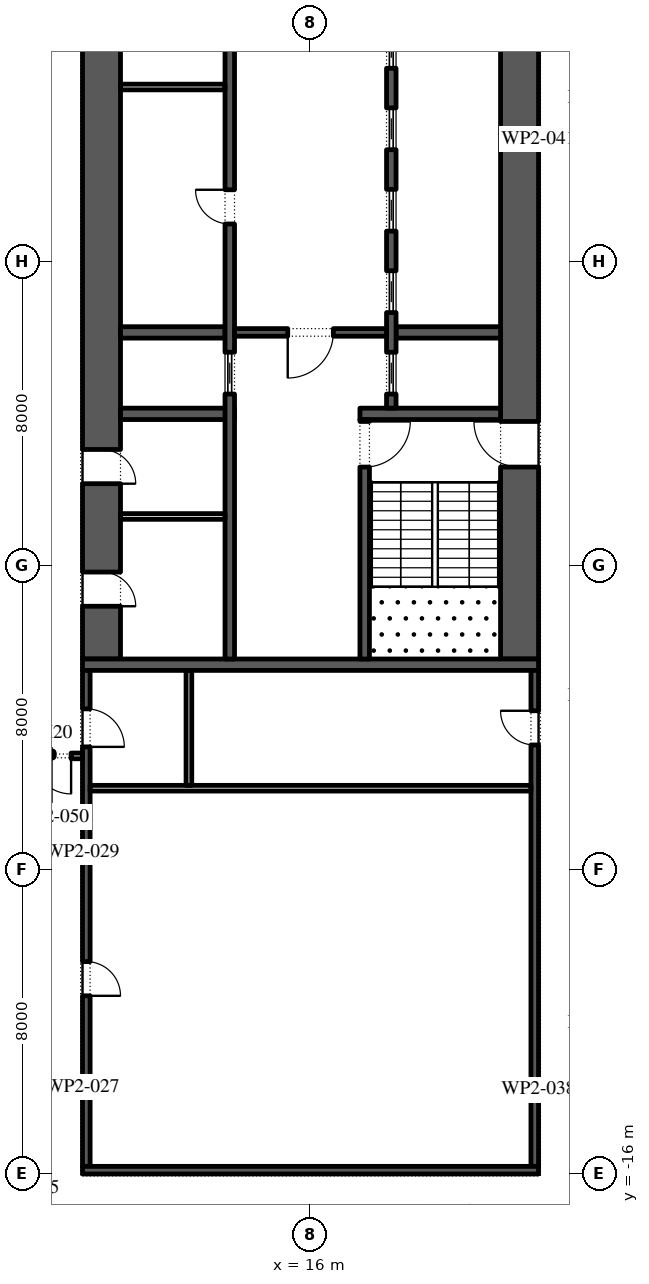
"""IFC4 building model, lengths in metres.
Left out: names, types, materials, properties, quantities, classifications, styles, units other than length and angle.
Written with IfcOpenShell. Run it as: python <this file> out.ifc"""

import sys

from ifc_helpers import new_model, si_unit, direction, frame, frame_2d, origin, place, context, subcontext, project, spatial, rectangle, extrude, element, fill, save


model = new_model("IFC4")
c1 = context("Model", 3, precision=1e-05, world=origin(), true_north=direction((0.0, 1.0)))
c2 = subcontext(c1, "Body", "Model", "MODEL_VIEW")
j1 = project(units=[si_unit("LENGTHUNIT", "METRE"), si_unit("PLANEANGLEUNIT", "RADIAN")], contexts=[c1])
p1 = place(None, origin())
s1 = spatial("IfcSite", under=j1, at=p1, CompositionType="ELEMENT")
p2 = place(p1, origin())
s2 = spatial("IfcBuilding", under=s1, at=p2, CompositionType="ELEMENT")
p3 = place(p2, frame((0.0, 0.0, 43.8)))
s3 = spatial("IfcBuildingStorey", under=s2, at=p3, CompositionType="ELEMENT", Elevation=43.8)
p4 = place(p3, frame((21.5, -2.45, 0.0), z_axis=(0.0, 0.0, 1.0), x_axis=(0.0, 1.0, 0.0)))
e1 = element("IfcWall", 1, at=p4, inside=s3, PredefinedType="SHEAR", context=c2, shape_type="SweptSolid", body=[
    extrude(rectangle(XDim=27.9, YDim=1.0, at=frame_2d((13.95, 0.0))), origin(), (0.0, 0.0, 1.0), 4.0),
])
p5 = place(p4, frame((5.05, 0.0, 0.0)))
e2 = element("IfcOpeningElement", 2, at=p5, cuts=e1, PredefinedType="OPENING", context=c2, shape_type="SweptSolid", body=[
    extrude(rectangle(XDim=1.2, YDim=2.1, at=frame_2d((0.6, 1.05))), frame((0.0, 0.51, 0.0), z_axis=(0.0, -1.0, 0.0), x_axis=(1.0, 0.0, 0.0)), (0.0, 0.0, 1.0), 1.02),
])
p6 = place(p4, frame((21.65, 0.0, 0.0)))
e3 = element("IfcOpeningElement", 3, at=p6, cuts=e1, PredefinedType="OPENING", context=c2, shape_type="SweptSolid", body=[
    extrude(rectangle(XDim=1.2, YDim=2.1, at=frame_2d((0.6, 1.05))), frame((0.0, 0.51, 0.0), z_axis=(0.0, -1.0, 0.0), x_axis=(1.0, 0.0, 0.0)), (0.0, 0.0, 1.0), 1.02),
])
p7 = place(p3, frame((10.5, -2.45, 0.0), z_axis=(0.0, 0.0, 1.0), x_axis=(0.0, 1.0, 0.0)))
e4 = element("IfcWall", 4, at=p7, inside=s3, PredefinedType="SHEAR", context=c2, shape_type="SweptSolid", body=[
    extrude(rectangle(XDim=27.9, YDim=1.0, at=frame_2d((13.95, 0.0))), origin(), (0.0, 0.0, 1.0), 4.0),
])
p8 = place(p7, frame((23.65, 0.0, 0.0)))
e5 = element("IfcOpeningElement", 5, at=p8, cuts=e4, PredefinedType="OPENING", context=c2, shape_type="SweptSolid", body=[
    extrude(rectangle(XDim=2.4, YDim=2.1, at=frame_2d((1.2, 1.05))), frame((0.0, 0.51, 0.0), z_axis=(0.0, -1.0, 0.0), x_axis=(1.0, 0.0, 0.0)), (0.0, 0.0, 1.0), 1.02),
])
p9 = place(p7, frame((1.387, 0.0, 0.0)))
e6 = element("IfcOpeningElement", 6, at=p9, cuts=e4, PredefinedType="OPENING", context=c2, shape_type="SweptSolid", body=[
    extrude(rectangle(XDim=0.9, YDim=2.1, at=frame_2d((0.45, 1.05))), frame((0.0, 0.51, 0.0), z_axis=(0.0, -1.0, 0.0), x_axis=(1.0, 0.0, 0.0)), (0.0, 0.0, 1.0), 1.02),
])
p10 = place(p7, frame((4.613, 0.0, 0.0)))
e7 = element("IfcOpeningElement", 7, at=p10, cuts=e4, PredefinedType="OPENING", context=c2, shape_type="SweptSolid", body=[
    extrude(rectangle(XDim=0.9, YDim=2.1, at=frame_2d((0.45, 1.05))), frame((0.0, 0.51, 0.0), z_axis=(0.0, -1.0, 0.0), x_axis=(1.0, 0.0, 0.0)), (0.0, 0.0, 1.0), 1.02),
])
p11 = place(p3, frame((10.0, -2.6, 0.0), z_axis=(0.0, 0.0, 1.0), x_axis=(1.0, 0.0, 0.0)))
e8 = element("IfcWall", 8, at=p11, inside=s3, PredefinedType="SHEAR", context=c2, shape_type="SweptSolid", body=[
    extrude(rectangle(XDim=12.0, YDim=0.3, at=frame_2d((6.0, 0.0))), origin(), (0.0, 0.0, 1.0), 4.0),
])
p12 = place(p3, frame((17.3, 4.0, 0.0), z_axis=(0.0, 0.0, 1.0), x_axis=(1.0, 0.0, 0.0)))
e9 = element("IfcWall", 9, at=p12, inside=s3, PredefinedType="SHEAR", context=c2, shape_type="SweptSolid", body=[
    extrude(rectangle(XDim=3.7, YDim=0.3, at=frame_2d((1.85, 0.0))), origin(), (0.0, 0.0, 1.0), 4.0),
])
p13 = place(p3, frame((17.425, -2.45, 0.0), z_axis=(0.0, 0.0, 1.0), x_axis=(0.0, 1.0, 0.0)))
e10 = element("IfcWall", 10, at=p13, inside=s3, PredefinedType="SHEAR", context=c2, shape_type="SweptSolid", body=[
    extrude(rectangle(XDim=6.3, YDim=0.25, at=frame_2d((3.15, 0.0))), origin(), (0.0, 0.0, 1.0), 4.0),
])
p14 = place(p13, frame((5.05, 0.0, 0.0)))
e11 = element("IfcOpeningElement", 11, at=p14, cuts=e10, PredefinedType="OPENING", context=c2, shape_type="SweptSolid", body=[
    extrude(rectangle(XDim=1.2, YDim=2.1, at=frame_2d((0.6, 1.05))), frame((0.0, 0.135, 0.0), z_axis=(0.0, -1.0, 0.0), x_axis=(1.0, 0.0, 0.0)), (0.0, 0.0, 1.0), 0.27),
])
p15 = place(p3, frame((18.25, 6.143, 0.0), z_axis=(0.0, 0.0, 1.0), x_axis=(1.0, 0.0, 0.0)))
e12 = element("IfcWall", 12, at=p15, inside=s3, PredefinedType="SHEAR", context=c2, shape_type="SweptSolid", body=[
    extrude(rectangle(XDim=2.75, YDim=0.3, at=frame_2d((1.375, 0.0))), origin(), (0.0, 0.0, 1.0), 4.0),
])
p16 = place(p3, frame((18.125, 4.15, 0.0), z_axis=(0.0, 0.0, 1.0), x_axis=(0.0, 1.0, 0.0)))
e13 = element("IfcWall", 13, at=p16, inside=s3, PredefinedType="SHEAR", context=c2, shape_type="SweptSolid", body=[
    extrude(rectangle(XDim=14.7, YDim=0.25, at=frame_2d((7.35, 0.0))), origin(), (0.0, 0.0, 1.0), 4.0),
])
p17 = place(p16, frame((0.371, 0.0, 0.0)))
e14 = element("IfcOpeningElement", 14, at=p17, cuts=e13, PredefinedType="OPENING", context=c2, shape_type="SweptSolid", body=[
    extrude(rectangle(XDim=1.1, YDim=2.1, at=frame_2d((0.55, 1.05))), frame((0.0, 0.135, 0.0), z_axis=(0.0, -1.0, 0.0), x_axis=(1.0, 0.0, 0.0)), (0.0, 0.0, 1.0), 0.27),
])
p18 = place(p16, frame((2.514, 0.0, 0.0)))
e15 = element("IfcOpeningElement", 15, at=p18, cuts=e13, PredefinedType="OPENING", context=c2, shape_type="SweptSolid", body=[
    extrude(rectangle(XDim=1.1, YDim=2.1, at=frame_2d((0.55, 1.05))), frame((0.0, 0.135, 0.0), z_axis=(0.0, -1.0, 0.0), x_axis=(1.0, 0.0, 0.0)), (0.0, 0.0, 1.0), 0.27),
])
p19 = place(p16, frame((4.657, 0.0, 0.0)))
e16 = element("IfcOpeningElement", 16, at=p19, cuts=e13, PredefinedType="OPENING", context=c2, shape_type="SweptSolid", body=[
    extrude(rectangle(XDim=1.1, YDim=2.1, at=frame_2d((0.55, 1.05))), frame((0.0, 0.135, 0.0), z_axis=(0.0, -1.0, 0.0), x_axis=(1.0, 0.0, 0.0)), (0.0, 0.0, 1.0), 0.27),
])
p20 = place(p16, frame((6.8, 0.0, 0.0)))
e17 = element("IfcOpeningElement", 17, at=p20, cuts=e13, PredefinedType="OPENING", context=c2, shape_type="SweptSolid", body=[
    extrude(rectangle(XDim=1.1, YDim=2.1, at=frame_2d((0.55, 1.05))), frame((0.0, 0.135, 0.0), z_axis=(0.0, -1.0, 0.0), x_axis=(1.0, 0.0, 0.0)), (0.0, 0.0, 1.0), 0.27),
])
p21 = place(p16, frame((8.943, 0.0, 0.0)))
e18 = element("IfcOpeningElement", 18, at=p21, cuts=e13, PredefinedType="OPENING", context=c2, shape_type="SweptSolid", body=[
    extrude(rectangle(XDim=1.1, YDim=2.1, at=frame_2d((0.55, 1.05))), frame((0.0, 0.135, 0.0), z_axis=(0.0, -1.0, 0.0), x_axis=(1.0, 0.0, 0.0)), (0.0, 0.0, 1.0), 0.27),
])
p22 = place(p16, frame((11.086, 0.0, 0.0)))
e19 = element("IfcOpeningElement", 19, at=p22, cuts=e13, PredefinedType="OPENING", context=c2, shape_type="SweptSolid", body=[
    extrude(rectangle(XDim=1.1, YDim=2.1, at=frame_2d((0.55, 1.05))), frame((0.0, 0.135, 0.0), z_axis=(0.0, -1.0, 0.0), x_axis=(1.0, 0.0, 0.0)), (0.0, 0.0, 1.0), 0.27),
])
p23 = place(p16, frame((13.229, 0.0, 0.0)))
e20 = element("IfcOpeningElement", 20, at=p23, cuts=e13, PredefinedType="OPENING", context=c2, shape_type="SweptSolid", body=[
    extrude(rectangle(XDim=1.1, YDim=2.1, at=frame_2d((0.55, 1.05))), frame((0.0, 0.135, 0.0), z_axis=(0.0, -1.0, 0.0), x_axis=(1.0, 0.0, 0.0)), (0.0, 0.0, 1.0), 0.27),
])
p24 = place(p3, frame((11.0, 4.0, 0.0), z_axis=(0.0, 0.0, 1.0), x_axis=(1.0, 0.0, 0.0)))
e21 = element("IfcWall", 21, at=p24, inside=s3, PredefinedType="SHEAR", context=c2, shape_type="SweptSolid", body=[
    extrude(rectangle(XDim=3.0, YDim=0.3, at=frame_2d((1.5, 0.0))), origin(), (0.0, 0.0, 1.0), 4.0),
])
p25 = place(p3, frame((11.0, 6.143, 0.0), z_axis=(0.0, 0.0, 1.0), x_axis=(1.0, 0.0, 0.0)))
e22 = element("IfcWall", 22, at=p25, inside=s3, PredefinedType="SHEAR", context=c2, shape_type="SweptSolid", body=[
    extrude(rectangle(XDim=2.75, YDim=0.3, at=frame_2d((1.375, 0.0))), origin(), (0.0, 0.0, 1.0), 4.0),
])
p26 = place(p3, frame((13.875, -2.45, 0.0), z_axis=(0.0, 0.0, 1.0), x_axis=(0.0, 1.0, 0.0)))
e23 = element("IfcWall", 23, at=p26, inside=s3, PredefinedType="SHEAR", context=c2, shape_type="SweptSolid", body=[
    extrude(rectangle(XDim=21.3, YDim=0.25, at=frame_2d((10.65, 0.0))), origin(), (0.0, 0.0, 1.0), 4.0),
])
p27 = place(p26, frame((11.446, 0.0, 0.0)))
e24 = element("IfcOpeningElement", 24, at=p27, cuts=e23, PredefinedType="OPENING", context=c2, shape_type="SweptSolid", body=[
    extrude(rectangle(XDim=0.9, YDim=2.1, at=frame_2d((0.45, 1.05))), frame((0.0, 0.135, 0.0), z_axis=(0.0, -1.0, 0.0), x_axis=(1.0, 0.0, 0.0)), (0.0, 0.0, 1.0), 0.27),
])
p28 = place(p26, frame((17.725, 0.0, 0.0)))
e25 = element("IfcOpeningElement", 25, at=p28, cuts=e23, PredefinedType="OPENING", context=c2, shape_type="SweptSolid", body=[
    extrude(rectangle(XDim=0.9, YDim=2.1, at=frame_2d((0.45, 1.05))), frame((0.0, 0.135, 0.0), z_axis=(0.0, -1.0, 0.0), x_axis=(1.0, 0.0, 0.0)), (0.0, 0.0, 1.0), 0.27),
])
p29 = place(p26, frame((6.971, 0.0, 0.0)))
e26 = element("IfcOpeningElement", 26, at=p29, cuts=e23, PredefinedType="OPENING", context=c2, shape_type="SweptSolid", body=[
    extrude(rectangle(XDim=1.1, YDim=2.1, at=frame_2d((0.55, 1.05))), frame((0.0, 0.135, 0.0), z_axis=(0.0, -1.0, 0.0), x_axis=(1.0, 0.0, 0.0)), (0.0, 0.0, 1.0), 0.27),
])
p30 = place(p3, frame((11.0, 12.6, 0.0), z_axis=(0.0, 0.0, 1.0), x_axis=(1.0, 0.0, 0.0)))
e27 = element("IfcWall", 27, at=p30, inside=s3, PredefinedType="PARTITIONING", context=c2, shape_type="SweptSolid", body=[
    extrude(rectangle(XDim=2.75, YDim=0.15, at=frame_2d((1.375, 0.0))), origin(), (0.0, 0.0, 1.0), 4.0),
])
p31 = place(p3, frame((14.0, 6.143, 0.0), z_axis=(0.0, 0.0, 1.0), x_axis=(1.0, 0.0, 0.0)))
e28 = element("IfcWall", 28, at=p31, inside=s3, PredefinedType="SHEAR", context=c2, shape_type="SweptSolid", body=[
    extrude(rectangle(XDim=4.0, YDim=0.2, at=frame_2d((2.0, 0.0))), origin(), (0.0, 0.0, 1.0), 4.0),
])
p32 = place(p31, frame((1.4, 0.0, 0.0)))
e29 = element("IfcOpeningElement", 29, at=p32, cuts=e28, PredefinedType="OPENING", context=c2, shape_type="SweptSolid", body=[
    extrude(rectangle(XDim=1.2, YDim=2.1, at=frame_2d((0.6, 1.05))), frame((0.0, 0.11, 0.0), z_axis=(0.0, -1.0, 0.0), x_axis=(1.0, 0.0, 0.0)), (0.0, 0.0, 1.0), 0.22),
])
p33 = place(p3, frame((11.0, 1.3, 0.0), z_axis=(0.0, 0.0, 1.0), x_axis=(1.0, 0.0, 0.0)))
e30 = element("IfcWall", 30, at=p33, inside=s3, PredefinedType="PARTITIONING", context=c2, shape_type="SweptSolid", body=[
    extrude(rectangle(XDim=2.75, YDim=0.15, at=frame_2d((1.375, 0.0))), origin(), (0.0, 0.0, 1.0), 4.0),
])
p34 = place(p3, frame((21.9, -15.8, 0.0), z_axis=(0.0, 0.0, 1.0), x_axis=(0.0, 1.0, 0.0)))
e31 = element("IfcWall", 31, at=p34, inside=s3, PredefinedType="SHEAR", context=c2, shape_type="SweptSolid", body=[
    extrude(rectangle(XDim=13.05, YDim=0.2, at=frame_2d((6.525, 0.0))), origin(), (0.0, 0.0, 1.0), 4.0),
])
p35 = place(p34, frame((11.087, 0.0, 0.0)))
e32 = element("IfcOpeningElement", 32, at=p35, cuts=e31, PredefinedType="OPENING", context=c2, shape_type="SweptSolid", body=[
    extrude(rectangle(XDim=0.9, YDim=2.1, at=frame_2d((0.45, 1.05))), frame((0.0, 0.11, 0.0), z_axis=(0.0, -1.0, 0.0), x_axis=(1.0, 0.0, 0.0)), (0.0, 0.0, 1.0), 0.22),
])
p36 = place(p3, frame((10.1, -15.8, 0.0), z_axis=(0.0, 0.0, 1.0), x_axis=(0.0, 1.0, 0.0)))
e33 = element("IfcWall", 33, at=p36, inside=s3, PredefinedType="SHEAR", context=c2, shape_type="SweptSolid", body=[
    extrude(rectangle(XDim=13.05, YDim=0.2, at=frame_2d((6.525, 0.0))), origin(), (0.0, 0.0, 1.0), 4.0),
])
p37 = place(p36, frame((4.488, 0.0, 0.0)))
e34 = element("IfcOpeningElement", 34, at=p37, cuts=e33, PredefinedType="OPENING", context=c2, shape_type="SweptSolid", body=[
    extrude(rectangle(XDim=0.9, YDim=2.1, at=frame_2d((0.45, 1.05))), frame((0.0, 0.11, 0.0), z_axis=(0.0, -1.0, 0.0), x_axis=(1.0, 0.0, 0.0)), (0.0, 0.0, 1.0), 0.22),
])
p38 = place(p36, frame((11.038, 0.0, 0.0)))
e35 = element("IfcOpeningElement", 35, at=p38, cuts=e33, PredefinedType="OPENING", context=c2, shape_type="SweptSolid", body=[
    extrude(rectangle(XDim=1.0, YDim=2.1, at=frame_2d((0.5, 1.05))), frame((0.0, 0.11, 0.0), z_axis=(0.0, -1.0, 0.0), x_axis=(1.0, 0.0, 0.0)), (0.0, 0.0, 1.0), 0.22),
])
p39 = place(p3, frame((10.0, -15.9, 0.0), z_axis=(0.0, 0.0, 1.0), x_axis=(1.0, 0.0, 0.0)))
e36 = element("IfcWall", 36, at=p39, inside=s3, PredefinedType="SHEAR", context=c2, shape_type="SweptSolid", body=[
    extrude(rectangle(XDim=12.0, YDim=0.2, at=frame_2d((6.0, 0.0))), origin(), (0.0, 0.0, 1.0), 4.0),
])
p40 = place(p3, frame((10.2, -5.85, 0.0), z_axis=(0.0, 0.0, 1.0), x_axis=(1.0, 0.0, 0.0)))
e37 = element("IfcWall", 37, at=p40, inside=s3, PredefinedType="PARTITIONING", context=c2, shape_type="SweptSolid", body=[
    extrude(rectangle(XDim=11.6, YDim=0.15, at=frame_2d((5.8, 0.0))), origin(), (0.0, 0.0, 1.0), 4.0),
])
p41 = place(p3, frame((12.8, -5.775, 0.0), z_axis=(0.0, 0.0, 1.0), x_axis=(0.0, 1.0, 0.0)))
e38 = element("IfcWall", 38, at=p41, inside=s3, PredefinedType="PARTITIONING", context=c2, shape_type="SweptSolid", body=[
    extrude(rectangle(XDim=3.025, YDim=0.15, at=frame_2d((1.512, 0.0))), origin(), (0.0, 0.0, 1.0), 4.0),
])
p42 = place(p3, frame((10.0, -5.0, 0.0), z_axis=(0.0, 0.0, 1.0), x_axis=(-1.0, 0.0, 0.0)))
e39 = element("IfcWall", 39, at=p42, inside=s3, PredefinedType="PARTITIONING", context=c2, shape_type="SweptSolid", body=[
    extrude(rectangle(XDim=1.6, YDim=0.15, at=frame_2d((0.8, 0.0))), origin(), (0.0, 0.0, 1.0), 4.0),
])
p43 = place(p42, frame((0.3, 0.0, 0.0)))
e40 = element("IfcOpeningElement", 40, at=p43, cuts=e39, PredefinedType="OPENING", context=c2, shape_type="SweptSolid", body=[
    extrude(rectangle(XDim=1.0, YDim=2.1, at=frame_2d((0.5, 1.05))), frame((0.0, 0.085, 0.0), z_axis=(0.0, -1.0, 0.0), x_axis=(1.0, 0.0, 0.0)), (0.0, 0.0, 1.0), 0.17),
])
p44 = place(p17, origin())
e41 = element("IfcDoor", 41, at=p44, inside=s3, OperationType="SLIDING_TO_LEFT", PredefinedType="DOOR", context=c2, shape_type="SweptSolid", body=[
    extrude(rectangle(XDim=1.1, YDim=2.1, at=frame_2d((0.55, 1.05))), frame((0.0, 0.025, 0.0), z_axis=(0.0, -1.0, 0.0), x_axis=(1.0, 0.0, 0.0)), (0.0, 0.0, 1.0), 0.05),
])
fill(e14, e41)
p45 = place(p18, origin())
e42 = element("IfcDoor", 42, at=p45, inside=s3, OperationType="SLIDING_TO_LEFT", PredefinedType="DOOR", context=c2, shape_type="SweptSolid", body=[
    extrude(rectangle(XDim=1.1, YDim=2.1, at=frame_2d((0.55, 1.05))), frame((0.0, 0.025, 0.0), z_axis=(0.0, -1.0, 0.0), x_axis=(1.0, 0.0, 0.0)), (0.0, 0.0, 1.0), 0.05),
])
fill(e15, e42)
p46 = place(p19, origin())
e43 = element("IfcDoor", 43, at=p46, inside=s3, OperationType="SLIDING_TO_LEFT", PredefinedType="DOOR", context=c2, shape_type="SweptSolid", body=[
    extrude(rectangle(XDim=1.1, YDim=2.1, at=frame_2d((0.55, 1.05))), frame((0.0, 0.025, 0.0), z_axis=(0.0, -1.0, 0.0), x_axis=(1.0, 0.0, 0.0)), (0.0, 0.0, 1.0), 0.05),
])
fill(e16, e43)
p47 = place(p20, origin())
e44 = element("IfcDoor", 44, at=p47, inside=s3, OperationType="SLIDING_TO_LEFT", PredefinedType="DOOR", context=c2, shape_type="SweptSolid", body=[
    extrude(rectangle(XDim=1.1, YDim=2.1, at=frame_2d((0.55, 1.05))), frame((0.0, 0.025, 0.0), z_axis=(0.0, -1.0, 0.0), x_axis=(1.0, 0.0, 0.0)), (0.0, 0.0, 1.0), 0.05),
])
fill(e17, e44)
p48 = place(p21, origin())
e45 = element("IfcDoor", 45, at=p48, inside=s3, OperationType="SLIDING_TO_LEFT", PredefinedType="DOOR", context=c2, shape_type="SweptSolid", body=[
    extrude(rectangle(XDim=1.1, YDim=2.1, at=frame_2d((0.55, 1.05))), frame((0.0, 0.025, 0.0), z_axis=(0.0, -1.0, 0.0), x_axis=(1.0, 0.0, 0.0)), (0.0, 0.0, 1.0), 0.05),
])
fill(e18, e45)
p49 = place(p27, origin())
e46 = element("IfcDoor", 46, at=p49, inside=s3, OperationType="SINGLE_SWING_LEFT", PredefinedType="DOOR", context=c2, shape_type="SweptSolid", body=[
    extrude(rectangle(XDim=0.9, YDim=2.1, at=frame_2d((0.45, 1.05))), frame((0.0, 0.125, 0.0), z_axis=(0.0, -1.0, 0.0), x_axis=(1.0, 0.0, 0.0)), (0.0, 0.0, 1.0), 0.05),
])
fill(e24, e46)
p50 = place(p29, origin())
e47 = element("IfcDoor", 47, at=p50, inside=s3, OperationType="SLIDING_TO_LEFT", PredefinedType="DOOR", context=c2, shape_type="SweptSolid", body=[
    extrude(rectangle(XDim=1.1, YDim=2.1, at=frame_2d((0.55, 1.05))), frame((0.0, 0.025, 0.0), z_axis=(0.0, -1.0, 0.0), x_axis=(1.0, 0.0, 0.0)), (0.0, 0.0, 1.0), 0.05),
])
fill(e26, e47)
p51 = place(p32, frame((1.2, 0.0, 0.0), z_axis=(0.0, 0.0, 1.0), x_axis=(-1.0, 0.0, 0.0)))
e48 = element("IfcDoor", 48, at=p51, inside=s3, OperationType="SINGLE_SWING_LEFT", PredefinedType="DOOR", context=c2, shape_type="SweptSolid", body=[
    extrude(rectangle(XDim=1.2, YDim=2.1, at=frame_2d((0.6, 1.05))), frame((0.0, 0.025, 0.0), z_axis=(0.0, -1.0, 0.0), x_axis=(1.0, 0.0, 0.0)), (0.0, 0.0, 1.0), 0.05),
])
fill(e29, e48)
p52 = place(p14, frame((1.2, 0.0, 0.0), z_axis=(0.0, 0.0, 1.0), x_axis=(-1.0, 0.0, 0.0)))
e49 = element("IfcDoor", 49, at=p52, inside=s3, OperationType="SINGLE_SWING_RIGHT", PredefinedType="DOOR", context=c2, shape_type="SweptSolid", body=[
    extrude(rectangle(XDim=1.2, YDim=2.1, at=frame_2d((0.6, 1.05))), frame((0.0, 0.025, 0.0), z_axis=(0.0, -1.0, 0.0), x_axis=(1.0, 0.0, 0.0)), (0.0, 0.0, 1.0), 0.05),
])
fill(e11, e49)
p53 = place(p5, origin())
e50 = element("IfcDoor", 50, at=p53, inside=s3, OperationType="SINGLE_SWING_LEFT", PredefinedType="DOOR", context=c2, shape_type="SweptSolid", body=[
    extrude(rectangle(XDim=1.2, YDim=2.1, at=frame_2d((0.6, 1.05))), frame((0.0, 0.025, 0.0), z_axis=(0.0, -1.0, 0.0), x_axis=(1.0, 0.0, 0.0)), (0.0, 0.0, 1.0), 0.05),
])
fill(e2, e50)
p54 = place(p9, frame((0.9, -0.95, 0.0), z_axis=(0.0, 0.0, 1.0), x_axis=(-1.0, 0.0, 0.0)))
e51 = element("IfcDoor", 51, at=p54, inside=s3, OperationType="SINGLE_SWING_LEFT", PredefinedType="DOOR", context=c2, shape_type="SweptSolid", body=[
    extrude(rectangle(XDim=0.9, YDim=2.1, at=frame_2d((0.45, 1.05))), frame((0.0, -0.45, 0.0), z_axis=(0.0, -1.0, 0.0), x_axis=(1.0, 0.0, 0.0)), (0.0, 0.0, 1.0), 0.05),
])
fill(e6, e51)
p55 = place(p10, frame((0.9, -0.95, 0.0), z_axis=(0.0, 0.0, 1.0), x_axis=(-1.0, 0.0, 0.0)))
e52 = element("IfcDoor", 52, at=p55, inside=s3, OperationType="SINGLE_SWING_LEFT", PredefinedType="DOOR", context=c2, shape_type="SweptSolid", body=[
    extrude(rectangle(XDim=0.9, YDim=2.1, at=frame_2d((0.45, 1.05))), frame((0.0, -0.45, 0.0), z_axis=(0.0, -1.0, 0.0), x_axis=(1.0, 0.0, 0.0)), (0.0, 0.0, 1.0), 0.05),
])
fill(e7, e52)
p56 = place(p37, frame((0.9, -0.15, 0.0), z_axis=(0.0, 0.0, 1.0), x_axis=(-1.0, 0.0, 0.0)))
e53 = element("IfcDoor", 53, at=p56, inside=s3, OperationType="SINGLE_SWING_LEFT", PredefinedType="DOOR", context=c2, shape_type="SweptSolid", body=[
    extrude(rectangle(XDim=0.9, YDim=2.1, at=frame_2d((0.45, 1.05))), frame((0.0, -0.05, 0.0), z_axis=(0.0, -1.0, 0.0), x_axis=(1.0, 0.0, 0.0)), (0.0, 0.0, 1.0), 0.05),
])
fill(e34, e53)
p57 = place(p38, frame((1.0, -0.15, 0.0), z_axis=(0.0, 0.0, 1.0), x_axis=(-1.0, 0.0, 0.0)))
e54 = element("IfcDoor", 54, at=p57, inside=s3, OperationType="SINGLE_SWING_LEFT", PredefinedType="DOOR", context=c2, shape_type="SweptSolid", body=[
    extrude(rectangle(XDim=1.0, YDim=2.1, at=frame_2d((0.5, 1.05))), frame((0.0, -0.05, 0.0), z_axis=(0.0, -1.0, 0.0), x_axis=(1.0, 0.0, 0.0)), (0.0, 0.0, 1.0), 0.05),
])
fill(e35, e54)
p58 = place(p35, origin())
e55 = element("IfcDoor", 55, at=p58, inside=s3, OperationType="SINGLE_SWING_LEFT", PredefinedType="DOOR", context=c2, shape_type="SweptSolid", body=[
    extrude(rectangle(XDim=0.9, YDim=2.1, at=frame_2d((0.45, 1.05))), frame((0.0, 0.1, 0.0), z_axis=(0.0, -1.0, 0.0), x_axis=(1.0, 0.0, 0.0)), (0.0, 0.0, 1.0), 0.05),
])
fill(e32, e55)
p59 = place(p43, origin())
e56 = element("IfcDoor", 56, at=p59, inside=s3, OperationType="SINGLE_SWING_RIGHT", PredefinedType="DOOR", context=c2, shape_type="SweptSolid", body=[
    extrude(rectangle(XDim=1.0, YDim=2.1, at=frame_2d((0.5, 1.05))), frame((0.0, 0.025, 0.0), z_axis=(0.0, -1.0, 0.0), x_axis=(1.0, 0.0, 0.0)), (0.0, 0.0, 1.0), 0.05),
])
fill(e40, e56)
save(model, sys.argv[1])
